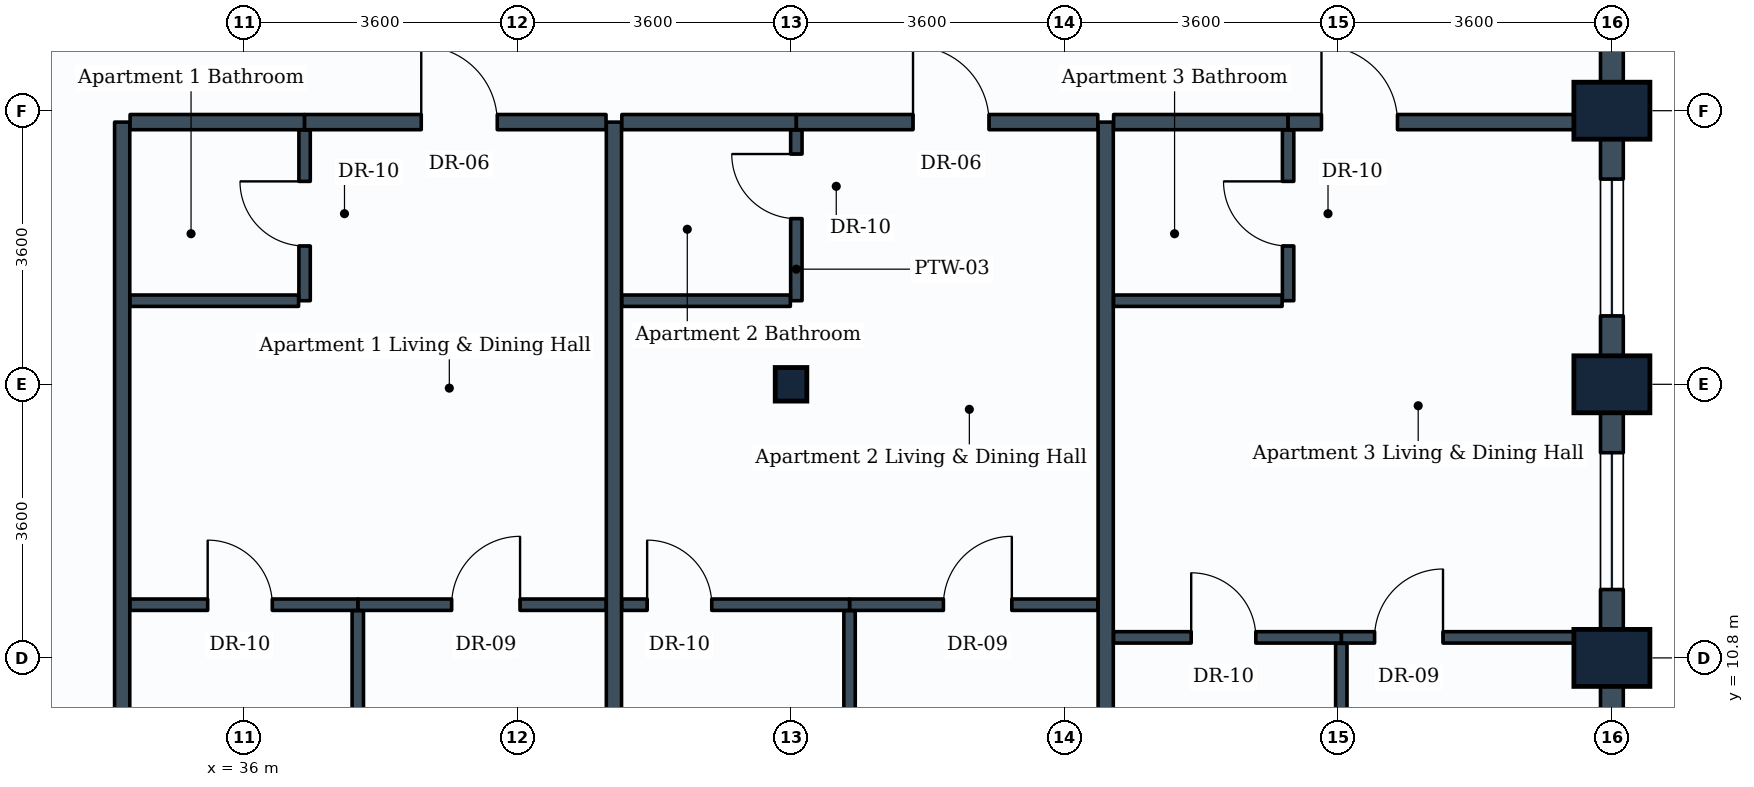
"""IFC4 building model, lengths in metres.
Left out: names, types, materials, properties, quantities, classifications, styles, units other than length and angle.
Written with IfcOpenShell. Run it as: python <this file> out.ifc"""

import sys

from ifc_helpers import new_model, si_unit, direction, frame, frame_2d, origin, origin_2d, place, context, subcontext, project, spatial, rectangle, i_section, extrude, element, fill, save


model = new_model("IFC4")
c1 = context("Model", 3, precision=1e-05, world=origin(), true_north=direction((0.0, 1.0)))
c2 = subcontext(c1, "Body", "Model", "MODEL_VIEW")
j1 = project(units=[si_unit("LENGTHUNIT", "METRE"), si_unit("PLANEANGLEUNIT", "RADIAN")], contexts=[c1])
p1 = place(None, origin())
s1 = spatial("IfcSite", under=j1, at=p1, CompositionType="ELEMENT")
p2 = place(p1, origin())
s2 = spatial("IfcBuilding", under=s1, at=p2, CompositionType="ELEMENT")
p3 = place(p2, frame((0.0, 0.0, 150.4)))
s3 = spatial("IfcBuildingStorey", under=s2, at=p3, CompositionType="ELEMENT", Elevation=150.4)
p4 = place(p3, frame((43.2, 14.4, 0.0), z_axis=(0.0, 0.0, 1.0), x_axis=(1.0, 0.0, 0.0)))
e1 = element("IfcColumn", 1, at=p4, inside=s3, PredefinedType="COLUMN", context=c2, shape_type="SweptSolid", body=[
    extrude(i_section(OverallWidth=0.416, OverallDepth=0.442, WebThickness=0.025, FlangeThickness=0.041, FilletRadius=0.015, at=origin_2d()), origin(), (0.0, 0.0, 1.0), 3.8),
])
for number, where, z_axis, x_axis in (
    (2, (54.0, 10.8, 0.0), (0.0, 0.0, 1.0), (0.0, 1.0, 0.0)),
    (3, (54.0, 14.4, 0.0), (0.0, 0.0, 1.0), (0.0, 1.0, 0.0)),
    (4, (54.0, 18.0, 0.0), (0.0, 0.0, 1.0), (0.0, 1.0, 0.0)),
):
    element("IfcColumn", number, at=place(p3, frame(where, z_axis=z_axis, x_axis=x_axis)), inside=s3, PredefinedType="COLUMN", context=c2, shape_type="SweptSolid", body=[
        extrude(rectangle(XDim=0.75, YDim=1.0, at=origin_2d()), origin(), (0.0, 0.0, 1.0), 3.8),
    ])
p5 = place(p3, frame((54.0, 10.8, 0.0), z_axis=(0.0, 0.0, 1.0), x_axis=(0.0, -1.0, 0.0)))
e5 = element("IfcWall", 5, at=p5, inside=s3, PredefinedType="STANDARD", context=c2, shape_type="SweptSolid", body=[
    extrude(rectangle(XDim=3.6, YDim=0.3, at=frame_2d((1.8, 0.0))), origin(), (0.0, 0.0, 1.0), 2.93),
])
p6 = place(p5, frame((0.875, 0.0, 0.85)))
e6 = element("IfcOpeningElement", 6, at=p6, cuts=e5, PredefinedType="OPENING", context=c2, shape_type="SweptSolid", body=[
    extrude(rectangle(XDim=1.8, YDim=1.35, at=frame_2d((0.9, 0.675))), frame((0.0, 0.16, 0.0), z_axis=(0.0, -1.0, 0.0), x_axis=(1.0, 0.0, 0.0)), (0.0, 0.0, 1.0), 0.32),
])
p7 = place(p3, frame((54.0, 14.4, 0.0), z_axis=(0.0, 0.0, 1.0), x_axis=(0.0, -1.0, 0.0)))
e7 = element("IfcWall", 7, at=p7, inside=s3, PredefinedType="STANDARD", context=c2, shape_type="SweptSolid", body=[
    extrude(rectangle(XDim=3.6, YDim=0.3, at=frame_2d((1.8, 0.0))), origin(), (0.0, 0.0, 1.0), 2.93),
])
p8 = place(p7, frame((0.9, 0.0, 0.85)))
e8 = element("IfcOpeningElement", 8, at=p8, cuts=e7, PredefinedType="OPENING", context=c2, shape_type="SweptSolid", body=[
    extrude(rectangle(XDim=1.8, YDim=1.35, at=frame_2d((0.9, 0.675))), frame((0.0, 0.16, 0.0), z_axis=(0.0, -1.0, 0.0), x_axis=(1.0, 0.0, 0.0)), (0.0, 0.0, 1.0), 0.32),
])
p9 = place(p3, frame((54.0, 18.0, 0.0), z_axis=(0.0, 0.0, 1.0), x_axis=(0.0, -1.0, 0.0)))
e9 = element("IfcWall", 9, at=p9, inside=s3, PredefinedType="STANDARD", context=c2, shape_type="SweptSolid", body=[
    extrude(rectangle(XDim=3.6, YDim=0.3, at=frame_2d((1.8, 0.0))), origin(), (0.0, 0.0, 1.0), 2.93),
])
p10 = place(p9, frame((0.9, 0.0, 0.85)))
e10 = element("IfcOpeningElement", 10, at=p10, cuts=e9, PredefinedType="OPENING", context=c2, shape_type="SweptSolid", body=[
    extrude(rectangle(XDim=1.8, YDim=1.35, at=frame_2d((0.9, 0.675))), frame((0.0, 0.16, 0.0), z_axis=(0.0, -1.0, 0.0), x_axis=(1.0, 0.0, 0.0)), (0.0, 0.0, 1.0), 0.32),
])
p11 = place(p3, frame((54.0, 21.6, 0.0), z_axis=(0.0, 0.0, 1.0), x_axis=(0.0, -1.0, 0.0)))
e11 = element("IfcWall", 11, at=p11, inside=s3, PredefinedType="STANDARD", context=c2, shape_type="SweptSolid", body=[
    extrude(rectangle(XDim=3.6, YDim=0.3, at=frame_2d((1.8, 0.0))), origin(), (0.0, 0.0, 1.0), 2.93),
])
for number, where, z_axis, x_axis in (
    (12, (34.4, 3.754, 0.0), (0.0, 0.0, 1.0), (0.0, 1.0, 0.0)),
    (13, (40.87, 3.754, 0.0), (0.0, 0.0, 1.0), (0.0, 1.0, 0.0)),
):
    element("IfcWall", number, at=place(p3, frame(where, z_axis=z_axis, x_axis=x_axis)), inside=s3, PredefinedType="PARTITIONING", context=c2, shape_type="SweptSolid", body=[
        extrude(rectangle(XDim=14.096, YDim=0.2, at=frame_2d((7.048, 0.0))), origin(), (0.0, 0.0, 1.0), 2.93),
    ])
p12 = place(p3, frame((34.504, 17.85, 0.0), z_axis=(0.0, 0.0, 1.0), x_axis=(1.0, 0.0, 0.0)))
e14 = element("IfcWall", 14, at=p12, inside=s3, PredefinedType="PARTITIONING", context=c2, shape_type="SweptSolid", body=[
    extrude(rectangle(XDim=2.296, YDim=0.2, at=frame_2d((1.148, 0.0))), origin(), (0.0, 0.0, 1.0), 3.17),
])
p13 = place(p3, frame((36.8, 15.5, 0.0), z_axis=(0.0, 0.0, 1.0), x_axis=(0.0, 1.0, 0.0)))
e15 = element("IfcWall", 15, at=p13, inside=s3, PredefinedType="PARTITIONING", context=c2, shape_type="SweptSolid", body=[
    extrude(rectangle(XDim=2.246, YDim=0.15, at=frame_2d((1.123, 0.0))), origin(), (0.0, 0.0, 1.0), 3.535),
])
p14 = place(p13, frame((0.72, 0.0, 0.0)))
e16 = element("IfcOpeningElement", 16, at=p14, cuts=e15, PredefinedType="OPENING", context=c2, shape_type="SweptSolid", body=[
    extrude(rectangle(XDim=0.85, YDim=2.1, at=frame_2d((0.425, 1.05))), frame((0.0, 0.085, 0.0), z_axis=(0.0, -1.0, 0.0), x_axis=(1.0, 0.0, 0.0)), (0.0, 0.0, 1.0), 0.17),
])
p15 = place(p3, frame((34.504, 15.5, 0.0), z_axis=(0.0, 0.0, 1.0), x_axis=(1.0, 0.0, 0.0)))
e17 = element("IfcWall", 17, at=p15, inside=s3, PredefinedType="PARTITIONING", context=c2, shape_type="SweptSolid", body=[
    extrude(rectangle(XDim=2.217, YDim=0.15, at=frame_2d((1.108, 0.0))), origin(), (0.0, 0.0, 1.0), 3.22),
])
p16 = place(p3, frame((36.8, 17.85, 0.0), z_axis=(0.0, 0.0, 1.0), x_axis=(1.0, 0.0, 0.0)))
e18 = element("IfcWall", 18, at=p16, inside=s3, PredefinedType="PARTITIONING", context=c2, shape_type="SweptSolid", body=[
    extrude(rectangle(XDim=3.966, YDim=0.2, at=frame_2d((1.983, 0.0))), origin(), (0.0, 0.0, 1.0), 3.17),
])
p17 = place(p16, frame((1.535, 0.0, 0.0)))
e19 = element("IfcOpeningElement", 19, at=p17, cuts=e18, PredefinedType="OPENING", context=c2, shape_type="SweptSolid", body=[
    extrude(rectangle(XDim=1.0, YDim=2.1, at=frame_2d((0.5, 1.05))), frame((0.0, 0.11, 0.0), z_axis=(0.0, -1.0, 0.0), x_axis=(1.0, 0.0, 0.0)), (0.0, 0.0, 1.0), 0.22),
])
p18 = place(p3, frame((37.5, 11.5, 0.0), z_axis=(0.0, 0.0, 1.0), x_axis=(1.0, 0.0, 0.0)))
e20 = element("IfcWall", 20, at=p18, inside=s3, PredefinedType="PARTITIONING", context=c2, shape_type="SweptSolid", body=[
    extrude(rectangle(XDim=3.266, YDim=0.15, at=frame_2d((1.633, 0.0))), origin(), (0.0, 0.0, 1.0), 3.17),
])
p19 = place(p18, frame((1.235, 0.0, 0.0)))
e21 = element("IfcOpeningElement", 21, at=p19, cuts=e20, PredefinedType="OPENING", context=c2, shape_type="SweptSolid", body=[
    extrude(rectangle(XDim=0.9, YDim=2.1, at=frame_2d((0.45, 1.05))), frame((0.0, 0.085, 0.0), z_axis=(0.0, -1.0, 0.0), x_axis=(1.0, 0.0, 0.0)), (0.0, 0.0, 1.0), 0.17),
])
p20 = place(p3, frame((34.504, 11.5, 0.0), z_axis=(0.0, 0.0, 1.0), x_axis=(1.0, 0.0, 0.0)))
e22 = element("IfcWall", 22, at=p20, inside=s3, PredefinedType="PARTITIONING", context=c2, shape_type="SweptSolid", body=[
    extrude(rectangle(XDim=2.996, YDim=0.15, at=frame_2d((1.498, 0.0))), origin(), (0.0, 0.0, 1.0), 3.22),
])
p21 = place(p20, frame((1.021, 0.0, 0.0)))
e23 = element("IfcOpeningElement", 23, at=p21, cuts=e22, PredefinedType="OPENING", context=c2, shape_type="SweptSolid", body=[
    extrude(rectangle(XDim=0.85, YDim=2.1, at=frame_2d((0.425, 1.05))), frame((0.0, 0.085, 0.0), z_axis=(0.0, -1.0, 0.0), x_axis=(1.0, 0.0, 0.0)), (0.0, 0.0, 1.0), 0.17),
])
p22 = place(p3, frame((37.5, 3.754, 0.0), z_axis=(0.0, 0.0, 1.0), x_axis=(0.0, 1.0, 0.0)))
e24 = element("IfcWall", 24, at=p22, inside=s3, PredefinedType="PARTITIONING", context=c2, shape_type="SweptSolid", body=[
    extrude(rectangle(XDim=7.667, YDim=0.15, at=frame_2d((3.833, 0.0))), origin(), (0.0, 0.0, 1.0), 2.93),
])
p23 = place(p3, frame((47.34, 3.754, 0.0), z_axis=(0.0, 0.0, 1.0), x_axis=(0.0, 1.0, 0.0)))
e25 = element("IfcWall", 25, at=p23, inside=s3, PredefinedType="PARTITIONING", context=c2, shape_type="SweptSolid", body=[
    extrude(rectangle(XDim=14.096, YDim=0.2, at=frame_2d((7.048, 0.0))), origin(), (0.0, 0.0, 1.0), 2.93),
])
p24 = place(p3, frame((40.974, 17.85, 0.0), z_axis=(0.0, 0.0, 1.0), x_axis=(1.0, 0.0, 0.0)))
e26 = element("IfcWall", 26, at=p24, inside=s3, PredefinedType="PARTITIONING", context=c2, shape_type="SweptSolid", body=[
    extrude(rectangle(XDim=2.296, YDim=0.2, at=frame_2d((1.148, 0.0))), origin(), (0.0, 0.0, 1.0), 3.18),
])
p25 = place(p3, frame((43.27, 15.5, 0.0), z_axis=(0.0, 0.0, 1.0), x_axis=(0.0, 1.0, 0.0)))
e27 = element("IfcWall", 27, at=p25, inside=s3, PredefinedType="PARTITIONING", context=c2, shape_type="SweptSolid", body=[
    extrude(rectangle(XDim=2.246, YDim=0.15, at=frame_2d((1.123, 0.0))), origin(), (0.0, 0.0, 1.0), 3.18),
])
p26 = place(p25, frame((1.08, 0.0, 0.0)))
e28 = element("IfcOpeningElement", 28, at=p26, cuts=e27, PredefinedType="OPENING", context=c2, shape_type="SweptSolid", body=[
    extrude(rectangle(XDim=0.85, YDim=2.1, at=frame_2d((0.425, 1.05))), frame((0.0, 0.085, 0.0), z_axis=(0.0, -1.0, 0.0), x_axis=(1.0, 0.0, 0.0)), (0.0, 0.0, 1.0), 0.17),
])
p27 = place(p3, frame((40.974, 15.5, 0.0), z_axis=(0.0, 0.0, 1.0), x_axis=(1.0, 0.0, 0.0)))
e29 = element("IfcWall", 29, at=p27, inside=s3, PredefinedType="PARTITIONING", context=c2, shape_type="SweptSolid", body=[
    extrude(rectangle(XDim=2.217, YDim=0.15, at=frame_2d((1.108, 0.0))), origin(), (0.0, 0.0, 1.0), 3.18),
])
p28 = place(p3, frame((43.27, 17.85, 0.0), z_axis=(0.0, 0.0, 1.0), x_axis=(1.0, 0.0, 0.0)))
e30 = element("IfcWall", 30, at=p28, inside=s3, PredefinedType="PARTITIONING", context=c2, shape_type="SweptSolid", body=[
    extrude(rectangle(XDim=3.966, YDim=0.2, at=frame_2d((1.983, 0.0))), origin(), (0.0, 0.0, 1.0), 3.17),
])
p29 = place(p28, frame((1.535, 0.0, 0.0)))
e31 = element("IfcOpeningElement", 31, at=p29, cuts=e30, PredefinedType="OPENING", context=c2, shape_type="SweptSolid", body=[
    extrude(rectangle(XDim=1.0, YDim=2.1, at=frame_2d((0.5, 1.05))), frame((0.0, 0.11, 0.0), z_axis=(0.0, -1.0, 0.0), x_axis=(1.0, 0.0, 0.0)), (0.0, 0.0, 1.0), 0.22),
])
p30 = place(p3, frame((43.97, 11.5, 0.0), z_axis=(0.0, 0.0, 1.0), x_axis=(1.0, 0.0, 0.0)))
e32 = element("IfcWall", 32, at=p30, inside=s3, PredefinedType="PARTITIONING", context=c2, shape_type="SweptSolid", body=[
    extrude(rectangle(XDim=3.266, YDim=0.15, at=frame_2d((1.633, 0.0))), origin(), (0.0, 0.0, 1.0), 3.17),
])
p31 = place(p30, frame((1.235, 0.0, 0.0)))
e33 = element("IfcOpeningElement", 33, at=p31, cuts=e32, PredefinedType="OPENING", context=c2, shape_type="SweptSolid", body=[
    extrude(rectangle(XDim=0.9, YDim=2.1, at=frame_2d((0.45, 1.05))), frame((0.0, 0.085, 0.0), z_axis=(0.0, -1.0, 0.0), x_axis=(1.0, 0.0, 0.0)), (0.0, 0.0, 1.0), 0.17),
])
p32 = place(p3, frame((40.974, 11.5, 0.0), z_axis=(0.0, 0.0, 1.0), x_axis=(1.0, 0.0, 0.0)))
e34 = element("IfcWall", 34, at=p32, inside=s3, PredefinedType="PARTITIONING", context=c2, shape_type="SweptSolid", body=[
    extrude(rectangle(XDim=2.996, YDim=0.15, at=frame_2d((1.498, 0.0))), origin(), (0.0, 0.0, 1.0), 3.18),
])
p33 = place(p32, frame((0.333, 0.0, 0.0)))
e35 = element("IfcOpeningElement", 35, at=p33, cuts=e34, PredefinedType="OPENING", context=c2, shape_type="SweptSolid", body=[
    extrude(rectangle(XDim=0.85, YDim=2.1, at=frame_2d((0.425, 1.05))), frame((0.0, 0.085, 0.0), z_axis=(0.0, -1.0, 0.0), x_axis=(1.0, 0.0, 0.0)), (0.0, 0.0, 1.0), 0.17),
])
p34 = place(p3, frame((43.97, 3.754, 0.0), z_axis=(0.0, 0.0, 1.0), x_axis=(0.0, 1.0, 0.0)))
e36 = element("IfcWall", 36, at=p34, inside=s3, PredefinedType="PARTITIONING", context=c2, shape_type="SweptSolid", body=[
    extrude(rectangle(XDim=7.667, YDim=0.15, at=frame_2d((3.833, 0.0))), origin(), (0.0, 0.0, 1.0), 2.93),
])
p35 = place(p3, frame((47.444, 17.85, 0.0), z_axis=(0.0, 0.0, 1.0), x_axis=(1.0, 0.0, 0.0)))
e37 = element("IfcWall", 37, at=p35, inside=s3, PredefinedType="PARTITIONING", context=c2, shape_type="SweptSolid", body=[
    extrude(rectangle(XDim=2.296, YDim=0.2, at=frame_2d((1.148, 0.0))), origin(), (0.0, 0.0, 1.0), 3.535),
])
p36 = place(p3, frame((49.74, 15.5, 0.0), z_axis=(0.0, 0.0, 1.0), x_axis=(0.0, 1.0, 0.0)))
e38 = element("IfcWall", 38, at=p36, inside=s3, PredefinedType="PARTITIONING", context=c2, shape_type="SweptSolid", body=[
    extrude(rectangle(XDim=2.246, YDim=0.15, at=frame_2d((1.123, 0.0))), origin(), (0.0, 0.0, 1.0), 3.535),
])
p37 = place(p36, frame((0.72, 0.0, 0.0)))
e39 = element("IfcOpeningElement", 39, at=p37, cuts=e38, PredefinedType="OPENING", context=c2, shape_type="SweptSolid", body=[
    extrude(rectangle(XDim=0.85, YDim=2.1, at=frame_2d((0.425, 1.05))), frame((0.0, 0.085, 0.0), z_axis=(0.0, -1.0, 0.0), x_axis=(1.0, 0.0, 0.0)), (0.0, 0.0, 1.0), 0.17),
])
p38 = place(p3, frame((47.444, 15.5, 0.0), z_axis=(0.0, 0.0, 1.0), x_axis=(1.0, 0.0, 0.0)))
e40 = element("IfcWall", 40, at=p38, inside=s3, PredefinedType="PARTITIONING", context=c2, shape_type="SweptSolid", body=[
    extrude(rectangle(XDim=2.217, YDim=0.15, at=frame_2d((1.108, 0.0))), origin(), (0.0, 0.0, 1.0), 3.535),
])
p39 = place(p3, frame((49.74, 17.85, 0.0), z_axis=(0.0, 0.0, 1.0), x_axis=(1.0, 0.0, 0.0)))
e41 = element("IfcWall", 41, at=p39, inside=s3, PredefinedType="PARTITIONING", context=c2, shape_type="SweptSolid", body=[
    extrude(rectangle(XDim=4.106, YDim=0.2, at=frame_2d((2.053, 0.0))), origin(), (0.0, 0.0, 1.0), 2.93),
])
p40 = place(p39, frame((0.439, 0.0, 0.0)))
e42 = element("IfcOpeningElement", 42, at=p40, cuts=e41, PredefinedType="OPENING", context=c2, shape_type="SweptSolid", body=[
    extrude(rectangle(XDim=1.0, YDim=2.1, at=frame_2d((0.5, 1.05))), frame((0.0, 0.11, 0.0), z_axis=(0.0, -1.0, 0.0), x_axis=(1.0, 0.0, 0.0)), (0.0, 0.0, 1.0), 0.22),
])
p41 = place(p3, frame((50.44, 11.07, 0.0), z_axis=(0.0, 0.0, 1.0), x_axis=(1.0, 0.0, 0.0)))
e43 = element("IfcWall", 43, at=p41, inside=s3, PredefinedType="PARTITIONING", context=c2, shape_type="SweptSolid", body=[
    extrude(rectangle(XDim=3.406, YDim=0.15, at=frame_2d((1.703, 0.0))), origin(), (0.0, 0.0, 1.0), 2.93),
])
p42 = place(p41, frame((0.438, 0.0, 0.0)))
e44 = element("IfcOpeningElement", 44, at=p42, cuts=e43, PredefinedType="OPENING", context=c2, shape_type="SweptSolid", body=[
    extrude(rectangle(XDim=0.9, YDim=2.1, at=frame_2d((0.45, 1.05))), frame((0.0, 0.085, 0.0), z_axis=(0.0, -1.0, 0.0), x_axis=(1.0, 0.0, 0.0)), (0.0, 0.0, 1.0), 0.17),
])
p43 = place(p3, frame((47.444, 11.07, 0.0), z_axis=(0.0, 0.0, 1.0), x_axis=(1.0, 0.0, 0.0)))
e45 = element("IfcWall", 45, at=p43, inside=s3, PredefinedType="PARTITIONING", context=c2, shape_type="SweptSolid", body=[
    extrude(rectangle(XDim=2.996, YDim=0.15, at=frame_2d((1.498, 0.0))), origin(), (0.0, 0.0, 1.0), 3.535),
])
p44 = place(p43, frame((1.021, 0.0, 0.0)))
e46 = element("IfcOpeningElement", 46, at=p44, cuts=e45, PredefinedType="OPENING", context=c2, shape_type="SweptSolid", body=[
    extrude(rectangle(XDim=0.85, YDim=2.1, at=frame_2d((0.425, 1.05))), frame((0.0, 0.085, 0.0), z_axis=(0.0, -1.0, 0.0), x_axis=(1.0, 0.0, 0.0)), (0.0, 0.0, 1.0), 0.17),
])
p45 = place(p3, frame((50.44, 5.605, 0.0), z_axis=(0.0, 0.0, 1.0), x_axis=(0.0, 1.0, 0.0)))
e47 = element("IfcWall", 47, at=p45, inside=s3, PredefinedType="PARTITIONING", context=c2, shape_type="SweptSolid", body=[
    extrude(rectangle(XDim=5.386, YDim=0.15, at=frame_2d((2.693, 0.0))), origin(), (0.0, 0.0, 1.0), 3.535),
])
p46 = place(p8, origin())
e48 = element("IfcWindow", 48, at=p46, inside=s3, PartitioningType="SINGLE_PANEL", PredefinedType="WINDOW", context=c2, shape_type="SweptSolid", body=[
    extrude(rectangle(XDim=1.8, YDim=1.35, at=frame_2d((0.9, 0.675))), frame((0.0, 0.03, 0.0), z_axis=(0.0, -1.0, 0.0), x_axis=(1.0, 0.0, 0.0)), (0.0, 0.0, 1.0), 0.06),
])
fill(e8, e48)
p47 = place(p10, origin())
e49 = element("IfcWindow", 49, at=p47, inside=s3, PartitioningType="SINGLE_PANEL", PredefinedType="WINDOW", context=c2, shape_type="SweptSolid", body=[
    extrude(rectangle(XDim=1.8, YDim=1.35, at=frame_2d((0.9, 0.675))), frame((0.0, 0.03, 0.0), z_axis=(0.0, -1.0, 0.0), x_axis=(1.0, 0.0, 0.0)), (0.0, 0.0, 1.0), 0.06),
])
fill(e10, e49)
p48 = place(p14, origin())
e50 = element("IfcDoor", 50, at=p48, inside=s3, OperationType="SINGLE_SWING_RIGHT", PredefinedType="DOOR", context=c2, shape_type="SweptSolid", body=[
    extrude(rectangle(XDim=0.85, YDim=2.1, at=frame_2d((0.425, 1.05))), frame((0.0, 0.025, 0.0), z_axis=(0.0, -1.0, 0.0), x_axis=(1.0, 0.0, 0.0)), (0.0, 0.0, 1.0), 0.05),
])
fill(e16, e50)
p49 = place(p17, origin())
e51 = element("IfcDoor", 51, at=p49, inside=s3, OperationType="SINGLE_SWING_LEFT", PredefinedType="DOOR", context=c2, shape_type="SweptSolid", body=[
    extrude(rectangle(XDim=1.0, YDim=2.1, at=frame_2d((0.5, 1.05))), frame((0.0, 0.025, 0.0), z_axis=(0.0, -1.0, 0.0), x_axis=(1.0, 0.0, 0.0)), (0.0, 0.0, 1.0), 0.05),
])
fill(e19, e51)
p50 = place(p19, origin())
e52 = element("IfcDoor", 52, at=p50, inside=s3, OperationType="SINGLE_SWING_RIGHT", PredefinedType="DOOR", context=c2, shape_type="SweptSolid", body=[
    extrude(rectangle(XDim=0.9, YDim=2.1, at=frame_2d((0.45, 1.05))), frame((0.0, 0.025, 0.0), z_axis=(0.0, -1.0, 0.0), x_axis=(1.0, 0.0, 0.0)), (0.0, 0.0, 1.0), 0.05),
])
fill(e21, e52)
p51 = place(p21, origin())
e53 = element("IfcDoor", 53, at=p51, inside=s3, OperationType="SINGLE_SWING_LEFT", PredefinedType="DOOR", context=c2, shape_type="SweptSolid", body=[
    extrude(rectangle(XDim=0.85, YDim=2.1, at=frame_2d((0.425, 1.05))), frame((0.0, 0.025, 0.0), z_axis=(0.0, -1.0, 0.0), x_axis=(1.0, 0.0, 0.0)), (0.0, 0.0, 1.0), 0.05),
])
fill(e23, e53)
p52 = place(p26, origin())
e54 = element("IfcDoor", 54, at=p52, inside=s3, OperationType="SINGLE_SWING_RIGHT", PredefinedType="DOOR", context=c2, shape_type="SweptSolid", body=[
    extrude(rectangle(XDim=0.85, YDim=2.1, at=frame_2d((0.425, 1.05))), frame((0.0, 0.025, 0.0), z_axis=(0.0, -1.0, 0.0), x_axis=(1.0, 0.0, 0.0)), (0.0, 0.0, 1.0), 0.05),
])
fill(e28, e54)
p53 = place(p29, origin())
e55 = element("IfcDoor", 55, at=p53, inside=s3, OperationType="SINGLE_SWING_LEFT", PredefinedType="DOOR", context=c2, shape_type="SweptSolid", body=[
    extrude(rectangle(XDim=1.0, YDim=2.1, at=frame_2d((0.5, 1.05))), frame((0.0, 0.025, 0.0), z_axis=(0.0, -1.0, 0.0), x_axis=(1.0, 0.0, 0.0)), (0.0, 0.0, 1.0), 0.05),
])
fill(e31, e55)
p54 = place(p31, origin())
e56 = element("IfcDoor", 56, at=p54, inside=s3, OperationType="SINGLE_SWING_RIGHT", PredefinedType="DOOR", context=c2, shape_type="SweptSolid", body=[
    extrude(rectangle(XDim=0.9, YDim=2.1, at=frame_2d((0.45, 1.05))), frame((0.0, 0.025, 0.0), z_axis=(0.0, -1.0, 0.0), x_axis=(1.0, 0.0, 0.0)), (0.0, 0.0, 1.0), 0.05),
])
fill(e33, e56)
p55 = place(p33, origin())
e57 = element("IfcDoor", 57, at=p55, inside=s3, OperationType="SINGLE_SWING_LEFT", PredefinedType="DOOR", context=c2, shape_type="SweptSolid", body=[
    extrude(rectangle(XDim=0.85, YDim=2.1, at=frame_2d((0.425, 1.05))), frame((0.0, 0.025, 0.0), z_axis=(0.0, -1.0, 0.0), x_axis=(1.0, 0.0, 0.0)), (0.0, 0.0, 1.0), 0.05),
])
fill(e35, e57)
p56 = place(p37, origin())
e58 = element("IfcDoor", 58, at=p56, inside=s3, OperationType="SINGLE_SWING_RIGHT", PredefinedType="DOOR", context=c2, shape_type="SweptSolid", body=[
    extrude(rectangle(XDim=0.85, YDim=2.1, at=frame_2d((0.425, 1.05))), frame((0.0, 0.025, 0.0), z_axis=(0.0, -1.0, 0.0), x_axis=(1.0, 0.0, 0.0)), (0.0, 0.0, 1.0), 0.05),
])
fill(e39, e58)
p57 = place(p40, origin())
e59 = element("IfcDoor", 59, at=p57, inside=s3, OperationType="SINGLE_SWING_LEFT", PredefinedType="DOOR", context=c2, shape_type="SweptSolid", body=[
    extrude(rectangle(XDim=1.0, YDim=2.1, at=frame_2d((0.5, 1.05))), frame((0.0, 0.025, 0.0), z_axis=(0.0, -1.0, 0.0), x_axis=(1.0, 0.0, 0.0)), (0.0, 0.0, 1.0), 0.05),
])
fill(e42, e59)
p58 = place(p42, origin())
e60 = element("IfcDoor", 60, at=p58, inside=s3, OperationType="SINGLE_SWING_RIGHT", PredefinedType="DOOR", context=c2, shape_type="SweptSolid", body=[
    extrude(rectangle(XDim=0.9, YDim=2.1, at=frame_2d((0.45, 1.05))), frame((0.0, 0.025, 0.0), z_axis=(0.0, -1.0, 0.0), x_axis=(1.0, 0.0, 0.0)), (0.0, 0.0, 1.0), 0.05),
])
fill(e44, e60)
p59 = place(p44, origin())
e61 = element("IfcDoor", 61, at=p59, inside=s3, OperationType="SINGLE_SWING_LEFT", PredefinedType="DOOR", context=c2, shape_type="SweptSolid", body=[
    extrude(rectangle(XDim=0.85, YDim=2.1, at=frame_2d((0.425, 1.05))), frame((0.0, 0.025, 0.0), z_axis=(0.0, -1.0, 0.0), x_axis=(1.0, 0.0, 0.0)), (0.0, 0.0, 1.0), 0.05),
])
fill(e46, e61)
save(model, sys.argv[1])
